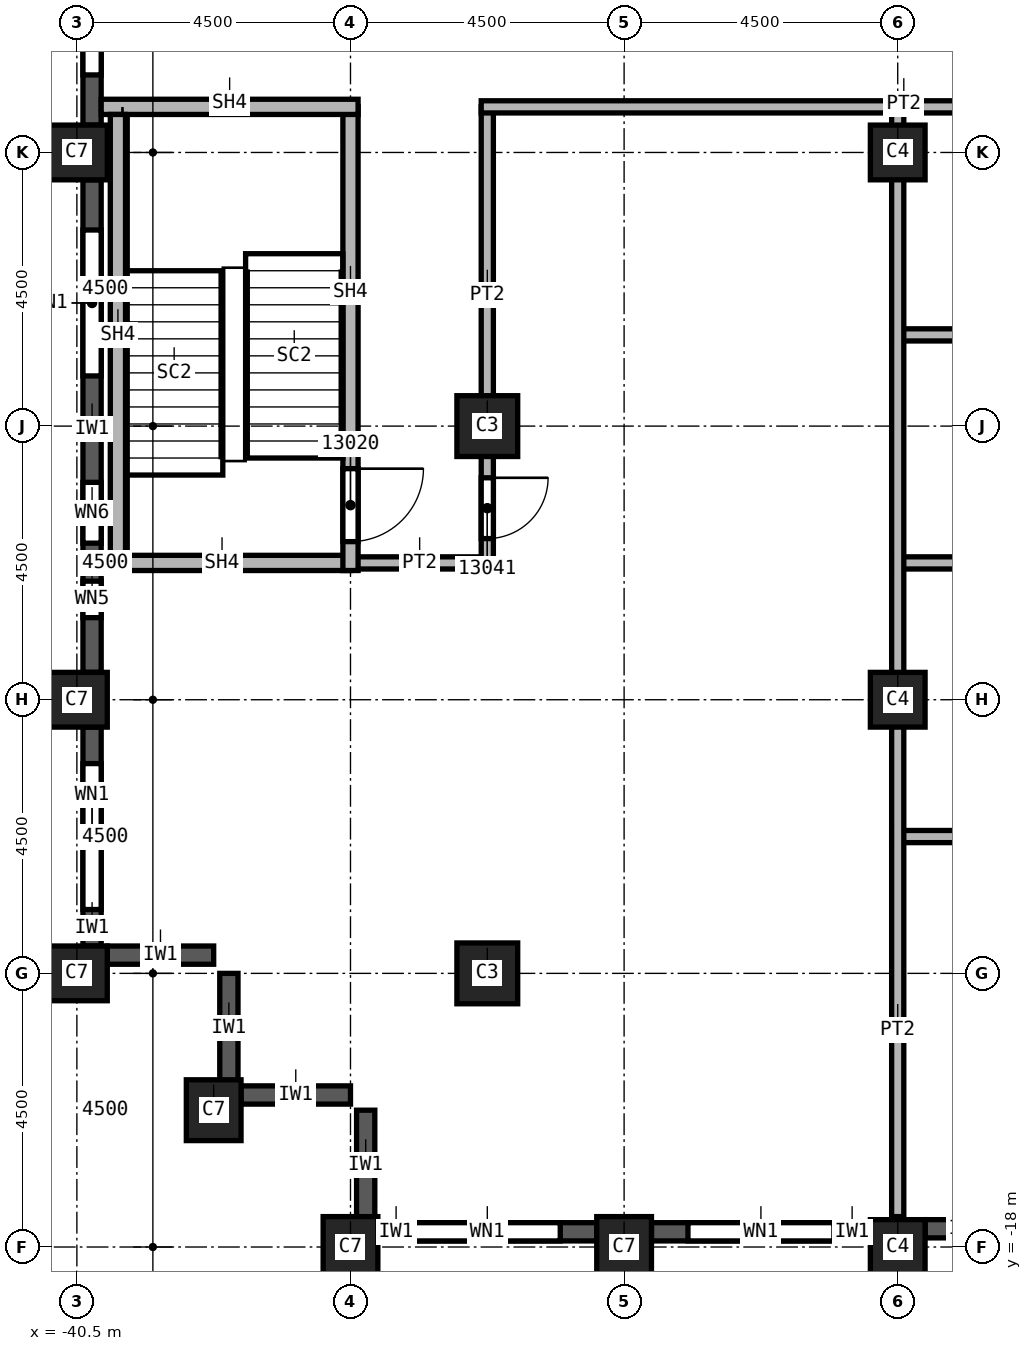
"""IFC4 building model, lengths in metres.
Left out: names, types, materials, properties, quantities, classifications, styles, units other than length and angle.
Written with IfcOpenShell. Run it as: python <this file> out.ifc"""

import sys

from ifc_helpers import new_model, si_unit, direction, frame, frame_2d, origin, origin_2d, place, context, subcontext, project, spatial, rectangle, extrude, element, fill, save


model = new_model("IFC4")
c1 = context("Model", 3, precision=1e-05, world=origin(), true_north=direction((0.0, 1.0)))
c2 = subcontext(c1, "Body", "Model", "MODEL_VIEW")
j1 = project(units=[si_unit("LENGTHUNIT", "METRE"), si_unit("PLANEANGLEUNIT", "RADIAN")], contexts=[c1])
p1 = place(None, origin())
s1 = spatial("IfcSite", under=j1, at=p1, CompositionType="ELEMENT")
p2 = place(p1, origin())
s2 = spatial("IfcBuilding", under=s1, at=p2, CompositionType="ELEMENT")
p3 = place(p2, frame((0.0, 0.0, 208.0)))
s3 = spatial("IfcBuildingStorey", under=s2, at=p3, CompositionType="ELEMENT", Elevation=208.0)
for number, where, z_axis, x_axis in (
    (1, (-40.5, 0.0, 0.0), (0.0, 0.0, 1.0), (0.0, 1.0, 0.0)),
    (2, (-40.5, -9.0, 0.0), (0.0, 0.0, 1.0), (0.0, 1.0, 0.0)),
    (3, (-40.5, -13.5, 0.0), (0.0, 0.0, 1.0), (0.0, 1.0, 0.0)),
    (4, (-38.25, -15.75, 0.0), (0.0, 0.0, 1.0), (1.0, 0.0, 0.0)),
    (5, (-31.5, -18.0, 0.0), (0.0, 0.0, 1.0), (1.0, 0.0, 0.0)),
    (6, (-36.0, -18.0, 0.0), (0.0, 0.0, 1.0), (1.0, 0.0, 0.0)),
):
    element("IfcColumn", number, at=place(p3, frame(where, z_axis=z_axis, x_axis=x_axis)), inside=s3, PredefinedType="COLUMN", context=c2, shape_type="SweptSolid", body=[
        extrude(rectangle(XDim=0.9, YDim=1.0, at=origin_2d()), origin(), (0.0, 0.0, 1.0), 3.72),
    ])
for number, where, z_axis, x_axis in (
    (7, (-33.75, -4.5, 0.0), (0.0, 0.0, 1.0), (1.0, 0.0, 0.0)),
    (8, (-33.75, -13.5, 0.0), (0.0, 0.0, 1.0), (1.0, 0.0, 0.0)),
):
    element("IfcColumn", number, at=place(p3, frame(where, z_axis=z_axis, x_axis=x_axis)), inside=s3, PredefinedType="COLUMN", context=c2, shape_type="SweptSolid", body=[
        extrude(rectangle(XDim=1.0, YDim=1.0, at=origin_2d()), origin(), (0.0, 0.0, 1.0), 3.72),
    ])
for number, where, z_axis, x_axis in (
    (9, (-27.0, 0.0, 0.0), (0.0, 0.0, 1.0), (1.0, 0.0, 0.0)),
    (10, (-27.0, -9.0, 0.0), (0.0, 0.0, 1.0), (1.0, 0.0, 0.0)),
    (11, (-27.0, -18.0, 0.0), (0.0, 0.0, 1.0), (1.0, 0.0, 0.0)),
):
    element("IfcColumn", number, at=place(p3, frame(where, z_axis=z_axis, x_axis=x_axis)), inside=s3, PredefinedType="COLUMN", context=c2, shape_type="SweptSolid", body=[
        extrude(rectangle(XDim=0.9, YDim=0.9, at=origin_2d()), origin(), (0.0, 0.0, 1.0), 3.72),
    ])
p4 = place(p3, frame((-40.0, -13.2, 0.0), z_axis=(0.0, 0.0, 1.0), x_axis=(1.0, 0.0, 0.0)))
e12 = element("IfcWall", 12, at=p4, inside=s3, PredefinedType="SOLIDWALL", context=c2, shape_type="SweptSolid", body=[
    extrude(rectangle(XDim=1.75, YDim=0.3, at=frame_2d((0.875, 0.0))), origin(), (0.0, 0.0, 1.0), 3.12),
])
for number, where, z_axis, x_axis in (
    (13, (-38.0, -15.3, 0.0), (0.0, 0.0, 1.0), (0.0, 1.0, 0.0)),
    (14, (-37.8, -15.5, 0.0), (0.0, 0.0, 1.0), (1.0, 0.0, 0.0)),
    (15, (-35.75, -17.55, 0.0), (0.0, 0.0, 1.0), (0.0, 1.0, 0.0)),
):
    element("IfcWall", number, at=place(p3, frame(where, z_axis=z_axis, x_axis=x_axis)), inside=s3, PredefinedType="SOLIDWALL", context=c2, shape_type="SweptSolid", body=[
        extrude(rectangle(XDim=1.8, YDim=0.3, at=frame_2d((0.9, 0.0))), origin(), (0.0, 0.0, 1.0), 3.12),
    ])
p5 = place(p3, frame((-40.25, 8.55, 0.0), z_axis=(0.0, 0.0, 1.0), x_axis=(0.0, -1.0, 0.0)))
e16 = element("IfcWall", 16, at=p5, inside=s3, PredefinedType="SOLIDWALL", context=c2, shape_type="SweptSolid", body=[
    extrude(rectangle(XDim=8.1, YDim=0.3, at=frame_2d((4.05, 0.0))), origin(), (0.0, 0.0, 1.0), 3.12),
])
p6 = place(p5, frame((0.825, 0.0, 0.8)))
e17 = element("IfcOpeningElement", 17, at=p6, cuts=e16, PredefinedType="OPENING", context=c2, shape_type="SweptSolid", body=[
    extrude(rectangle(XDim=2.4, YDim=1.95, at=frame_2d((1.2, 0.975))), frame((0.0, 0.15, 0.0), z_axis=(0.0, -1.0, 0.0), x_axis=(1.0, 0.0, 0.0)), (0.0, 0.0, 1.0), 0.3),
])
p7 = place(p5, frame((4.875, 0.0, 0.8)))
e18 = element("IfcOpeningElement", 18, at=p7, cuts=e16, PredefinedType="OPENING", context=c2, shape_type="SweptSolid", body=[
    extrude(rectangle(XDim=2.4, YDim=1.95, at=frame_2d((1.2, 0.975))), frame((0.0, 0.15, 0.0), z_axis=(0.0, -1.0, 0.0), x_axis=(1.0, 0.0, 0.0)), (0.0, 0.0, 1.0), 0.3),
])
p8 = place(p3, frame((-40.25, -0.45, 0.0), z_axis=(0.0, 0.0, 1.0), x_axis=(0.0, -1.0, 0.0)))
e19 = element("IfcWall", 19, at=p8, inside=s3, PredefinedType="SOLIDWALL", context=c2, shape_type="SweptSolid", body=[
    extrude(rectangle(XDim=8.1, YDim=0.3, at=frame_2d((4.05, 0.0))), origin(), (0.0, 0.0, 1.0), 3.12),
])
p9 = place(p8, frame((0.825, 0.0, 0.8)))
e20 = element("IfcOpeningElement", 20, at=p9, cuts=e19, PredefinedType="OPENING", context=c2, shape_type="SweptSolid", body=[
    extrude(rectangle(XDim=2.4, YDim=1.95, at=frame_2d((1.2, 0.975))), frame((0.0, 0.15, 0.0), z_axis=(0.0, -1.0, 0.0), x_axis=(1.0, 0.0, 0.0)), (0.0, 0.0, 1.0), 0.3),
])
p10 = place(p8, frame((4.975, 0.0, 0.8)))
e21 = element("IfcOpeningElement", 21, at=p10, cuts=e19, PredefinedType="OPENING", context=c2, shape_type="SweptSolid", body=[
    extrude(rectangle(XDim=1.0, YDim=1.95, at=frame_2d((0.5, 0.975))), frame((0.0, 0.15, 0.0), z_axis=(0.0, -1.0, 0.0), x_axis=(1.0, 0.0, 0.0)), (0.0, 0.0, 1.0), 0.3),
])
p11 = place(p8, frame((6.6, 0.0, 0.8)))
e22 = element("IfcOpeningElement", 22, at=p11, cuts=e19, PredefinedType="OPENING", context=c2, shape_type="SweptSolid", body=[
    extrude(rectangle(XDim=0.6, YDim=1.95, at=frame_2d((0.3, 0.975))), frame((0.0, 0.15, 0.0), z_axis=(0.0, -1.0, 0.0), x_axis=(1.0, 0.0, 0.0)), (0.0, 0.0, 1.0), 0.3),
])
p12 = place(p3, frame((-40.25, -9.45, 0.0), z_axis=(0.0, 0.0, 1.0), x_axis=(0.0, -1.0, 0.0)))
e23 = element("IfcWall", 23, at=p12, inside=s3, PredefinedType="SOLIDWALL", context=c2, shape_type="SweptSolid", body=[
    extrude(rectangle(XDim=3.6, YDim=0.3, at=frame_2d((1.8, 0.0))), origin(), (0.0, 0.0, 1.0), 3.12),
])
p13 = place(p12, frame((0.6, 0.0, 0.8)))
e24 = element("IfcOpeningElement", 24, at=p13, cuts=e23, PredefinedType="OPENING", context=c2, shape_type="SweptSolid", body=[
    extrude(rectangle(XDim=2.4, YDim=1.95, at=frame_2d((1.2, 0.975))), frame((0.0, 0.15, 0.0), z_axis=(0.0, -1.0, 0.0), x_axis=(1.0, 0.0, 0.0)), (0.0, 0.0, 1.0), 0.3),
])
p14 = place(p3, frame((-35.55, -17.75, 0.0), z_axis=(0.0, 0.0, 1.0), x_axis=(1.0, 0.0, 0.0)))
e25 = element("IfcWall", 25, at=p14, inside=s3, PredefinedType="SOLIDWALL", context=c2, shape_type="SweptSolid", body=[
    extrude(rectangle(XDim=3.6, YDim=0.3, at=frame_2d((1.8, 0.0))), origin(), (0.0, 0.0, 1.0), 3.12),
])
p15 = place(p14, frame((0.6, 0.0, 0.8)))
e26 = element("IfcOpeningElement", 26, at=p15, cuts=e25, PredefinedType="OPENING", context=c2, shape_type="SweptSolid", body=[
    extrude(rectangle(XDim=2.4, YDim=1.95, at=frame_2d((1.2, 0.975))), frame((0.0, 0.15, 0.0), z_axis=(0.0, -1.0, 0.0), x_axis=(1.0, 0.0, 0.0)), (0.0, 0.0, 1.0), 0.3),
])
p16 = place(p3, frame((-31.05, -17.75, 0.0), z_axis=(0.0, 0.0, 1.0), x_axis=(1.0, 0.0, 0.0)))
e27 = element("IfcWall", 27, at=p16, inside=s3, PredefinedType="SOLIDWALL", context=c2, shape_type="SweptSolid", body=[
    extrude(rectangle(XDim=3.6, YDim=0.3, at=frame_2d((1.8, 0.0))), origin(), (0.0, 0.0, 1.0), 3.12),
])
p17 = place(p16, frame((0.6, 0.0, 0.8)))
e28 = element("IfcOpeningElement", 28, at=p17, cuts=e27, PredefinedType="OPENING", context=c2, shape_type="SweptSolid", body=[
    extrude(rectangle(XDim=2.4, YDim=1.95, at=frame_2d((1.2, 0.975))), frame((0.0, 0.15, 0.0), z_axis=(0.0, -1.0, 0.0), x_axis=(1.0, 0.0, 0.0)), (0.0, 0.0, 1.0), 0.3),
])
p18 = place(p3, frame((-26.55, -17.7, 0.0), z_axis=(0.0, 0.0, 1.0), x_axis=(1.0, 0.0, 0.0)))
e29 = element("IfcWall", 29, at=p18, inside=s3, PredefinedType="SOLIDWALL", context=c2, shape_type="SweptSolid", body=[
    extrude(rectangle(XDim=1.35, YDim=0.3, at=frame_2d((0.675, 0.0))), origin(), (0.0, 0.0, 1.0), 3.12),
])
p19 = place(p3, frame((-33.75, -6.75, 0.0), z_axis=(0.0, 0.0, 1.0), x_axis=(-1.0, 0.0, 0.0)))
e30 = element("IfcWall", 30, at=p19, inside=s3, PredefinedType="PARTITIONING", context=c2, shape_type="SweptSolid", body=[
    extrude(rectangle(XDim=2.25, YDim=0.2, at=frame_2d((1.125, 0.0))), origin(), (0.0, 0.0, 1.0), 3.72),
])
p20 = place(p3, frame((-33.75, 0.75, 0.0), z_axis=(0.0, 0.0, 1.0), x_axis=(0.0, -1.0, 0.0)))
e31 = element("IfcWall", 31, at=p20, inside=s3, PredefinedType="PARTITIONING", context=c2, shape_type="SweptSolid", body=[
    extrude(rectangle(XDim=7.6, YDim=0.2, at=frame_2d((3.8, 0.0))), origin(), (0.0, 0.0, 1.0), 3.72),
])
p21 = place(p20, frame((6.1, 0.0, 0.0)))
e32 = element("IfcOpeningElement", 32, at=p21, cuts=e31, PredefinedType="OPENING", context=c2, shape_type="SweptSolid", body=[
    extrude(rectangle(XDim=1.0, YDim=2.1, at=frame_2d((0.5, 1.05))), frame((0.0, 0.1, 0.0), z_axis=(0.0, -1.0, 0.0), x_axis=(1.0, 0.0, 0.0)), (0.0, 0.0, 1.0), 0.2),
])
for number, where, z_axis, x_axis in (
    (33, (-27.1, -11.25, 0.0), (0.0, 0.0, 1.0), (1.0, 0.0, 0.0)),
    (34, (-27.1, -6.75, 0.0), (0.0, 0.0, 1.0), (1.0, 0.0, 0.0)),
    (35, (-27.1, -3.0, 0.0), (0.0, 0.0, 1.0), (1.0, 0.0, 0.0)),
):
    element("IfcWall", number, at=place(p3, frame(where, z_axis=z_axis, x_axis=x_axis)), inside=s3, PredefinedType="PARTITIONING", context=c2, shape_type="SweptSolid", body=[
        extrude(rectangle(XDim=11.7, YDim=0.2, at=frame_2d((5.85, 0.0))), origin(), (0.0, 0.0, 1.0), 3.72),
    ])
p22 = place(p3, frame((-27.0, -17.5, 0.0), z_axis=(0.0, 0.0, 1.0), x_axis=(0.0, 1.0, 0.0)))
e36 = element("IfcWall", 36, at=p22, inside=s3, PredefinedType="PARTITIONING", context=c2, shape_type="SweptSolid", body=[
    extrude(rectangle(XDim=18.25, YDim=0.2, at=frame_2d((9.125, 0.0))), origin(), (0.0, 0.0, 1.0), 3.72),
])
p23 = place(p3, frame((-15.4, 0.75, 0.0), z_axis=(0.0, 0.0, 1.0), x_axis=(-1.0, 0.0, 0.0)))
e37 = element("IfcWall", 37, at=p23, inside=s3, PredefinedType="PARTITIONING", context=c2, shape_type="SweptSolid", body=[
    extrude(rectangle(XDim=18.45, YDim=0.2, at=frame_2d((9.225, 0.0))), origin(), (0.0, 0.0, 1.0), 3.72),
])
p24 = place(p23, frame((3.55, 0.0, 0.0)))
e38 = element("IfcOpeningElement", 38, at=p24, cuts=e37, PredefinedType="OPENING", context=c2, shape_type="SweptSolid", body=[
    extrude(rectangle(XDim=1.0, YDim=2.1, at=frame_2d((0.5, 1.05))), frame((0.0, 0.1, 0.0), z_axis=(0.0, -1.0, 0.0), x_axis=(1.0, 0.0, 0.0)), (0.0, 0.0, 1.0), 0.2),
])
p25 = place(p3, frame((-36.0, -6.75, 0.0), z_axis=(0.0, 0.0, 1.0), x_axis=(-1.0, 0.0, 0.0)))
e39 = element("IfcWall", 39, at=p25, inside=s3, PredefinedType="SOLIDWALL", context=c2, shape_type="SweptSolid", body=[
    extrude(rectangle(XDim=4.1, YDim=0.25, at=frame_2d((2.05, 0.0))), origin(), (0.0, 0.0, 1.0), 3.72),
])
p26 = place(p3, frame((-36.0, 0.75, 0.0), z_axis=(0.0, 0.0, 1.0), x_axis=(0.0, -1.0, 0.0)))
e40 = element("IfcWall", 40, at=p26, inside=s3, PredefinedType="SOLIDWALL", context=c2, shape_type="SweptSolid", body=[
    extrude(rectangle(XDim=7.625, YDim=0.25, at=frame_2d((3.812, 0.0))), origin(), (0.0, 0.0, 1.0), 3.72),
])
p27 = place(p26, frame((5.95, 0.0, 0.0)))
e41 = element("IfcOpeningElement", 41, at=p27, cuts=e40, PredefinedType="OPENING", context=c2, shape_type="SweptSolid", body=[
    extrude(rectangle(XDim=1.2, YDim=2.1, at=frame_2d((0.6, 1.05))), frame((0.0, 0.125, 0.0), z_axis=(0.0, -1.0, 0.0), x_axis=(1.0, 0.0, 0.0)), (0.0, 0.0, 1.0), 0.25),
])
p28 = place(p3, frame((-35.875, 0.75, 0.0), z_axis=(0.0, 0.0, 1.0), x_axis=(-1.0, 0.0, 0.0)))
e42 = element("IfcWall", 42, at=p28, inside=s3, PredefinedType="SOLIDWALL", context=c2, shape_type="SweptSolid", body=[
    extrude(rectangle(XDim=4.225, YDim=0.25, at=frame_2d((2.113, 0.0))), origin(), (0.0, 0.0, 1.0), 3.72),
])
p29 = place(p3, frame((-39.825, -6.625, 0.0), z_axis=(0.0, 0.0, 1.0), x_axis=(0.0, 1.0, 0.0)))
e43 = element("IfcWall", 43, at=p29, inside=s3, PredefinedType="SOLIDWALL", context=c2, shape_type="SweptSolid", body=[
    extrude(rectangle(XDim=7.25, YDim=0.25, at=frame_2d((3.625, 0.0))), origin(), (0.0, 0.0, 1.0), 3.72),
])
p30 = place(p7, origin())
e44 = element("IfcWindow", 44, at=p30, inside=s3, PartitioningType="SINGLE_PANEL", PredefinedType="WINDOW", context=c2, shape_type="SweptSolid", body=[
    extrude(rectangle(XDim=2.4, YDim=1.95, at=frame_2d((1.2, 0.975))), frame((0.0, 0.03, 0.0), z_axis=(0.0, -1.0, 0.0), x_axis=(1.0, 0.0, 0.0)), (0.0, 0.0, 1.0), 0.06),
])
fill(e18, e44)
p31 = place(p9, origin())
e45 = element("IfcWindow", 45, at=p31, inside=s3, PartitioningType="SINGLE_PANEL", PredefinedType="WINDOW", context=c2, shape_type="SweptSolid", body=[
    extrude(rectangle(XDim=2.4, YDim=1.95, at=frame_2d((1.2, 0.975))), frame((0.0, 0.03, 0.0), z_axis=(0.0, -1.0, 0.0), x_axis=(1.0, 0.0, 0.0)), (0.0, 0.0, 1.0), 0.06),
])
fill(e20, e45)
p32 = place(p13, origin())
e46 = element("IfcWindow", 46, at=p32, inside=s3, PartitioningType="SINGLE_PANEL", PredefinedType="WINDOW", context=c2, shape_type="SweptSolid", body=[
    extrude(rectangle(XDim=2.4, YDim=1.95, at=frame_2d((1.2, 0.975))), frame((0.0, 0.03, 0.0), z_axis=(0.0, -1.0, 0.0), x_axis=(1.0, 0.0, 0.0)), (0.0, 0.0, 1.0), 0.06),
])
fill(e24, e46)
p33 = place(p15, origin())
e47 = element("IfcWindow", 47, at=p33, inside=s3, PartitioningType="SINGLE_PANEL", PredefinedType="WINDOW", context=c2, shape_type="SweptSolid", body=[
    extrude(rectangle(XDim=2.4, YDim=1.95, at=frame_2d((1.2, 0.975))), frame((0.0, 0.03, 0.0), z_axis=(0.0, -1.0, 0.0), x_axis=(1.0, 0.0, 0.0)), (0.0, 0.0, 1.0), 0.06),
])
fill(e26, e47)
p34 = place(p17, origin())
e48 = element("IfcWindow", 48, at=p34, inside=s3, PartitioningType="SINGLE_PANEL", PredefinedType="WINDOW", context=c2, shape_type="SweptSolid", body=[
    extrude(rectangle(XDim=2.4, YDim=1.95, at=frame_2d((1.2, 0.975))), frame((0.0, 0.03, 0.0), z_axis=(0.0, -1.0, 0.0), x_axis=(1.0, 0.0, 0.0)), (0.0, 0.0, 1.0), 0.06),
])
fill(e28, e48)
p35 = place(p27, origin())
e49 = element("IfcDoor", 49, at=p35, inside=s3, OperationType="SINGLE_SWING_LEFT", PredefinedType="DOOR", context=c2, shape_type="SweptSolid", body=[
    extrude(rectangle(XDim=1.2, YDim=2.1, at=frame_2d((0.6, 1.05))), frame((0.0, 0.025, 0.0), z_axis=(0.0, -1.0, 0.0), x_axis=(1.0, 0.0, 0.0)), (0.0, 0.0, 1.0), 0.05),
])
fill(e41, e49)
p36 = place(p21, origin())
e50 = element("IfcDoor", 50, at=p36, inside=s3, OperationType="SINGLE_SWING_RIGHT", PredefinedType="DOOR", context=c2, shape_type="SweptSolid", body=[
    extrude(rectangle(XDim=1.0, YDim=2.1, at=frame_2d((0.5, 1.05))), frame((0.0, 0.025, 0.0), z_axis=(0.0, -1.0, 0.0), x_axis=(1.0, 0.0, 0.0)), (0.0, 0.0, 1.0), 0.05),
])
fill(e32, e50)
p37 = place(p10, origin())
e51 = element("IfcWindow", 51, at=p37, inside=s3, PartitioningType="SINGLE_PANEL", PredefinedType="WINDOW", context=c2, shape_type="SweptSolid", body=[
    extrude(rectangle(XDim=1.0, YDim=1.95, at=frame_2d((0.5, 0.975))), frame((0.0, 0.03, 0.0), z_axis=(0.0, -1.0, 0.0), x_axis=(1.0, 0.0, 0.0)), (0.0, 0.0, 1.0), 0.06),
])
fill(e21, e51)
p38 = place(p11, origin())
e52 = element("IfcWindow", 52, at=p38, inside=s3, PartitioningType="SINGLE_PANEL", PredefinedType="WINDOW", context=c2, shape_type="SweptSolid", body=[
    extrude(rectangle(XDim=0.6, YDim=1.95, at=frame_2d((0.3, 0.975))), frame((0.0, 0.03, 0.0), z_axis=(0.0, -1.0, 0.0), x_axis=(1.0, 0.0, 0.0)), (0.0, 0.0, 1.0), 0.06),
])
fill(e22, e52)
save(model, sys.argv[1])
